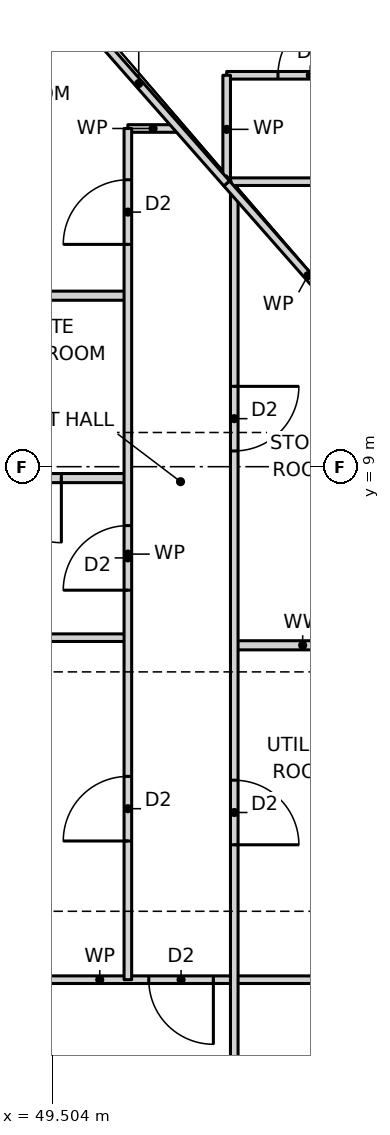
"""IFC4 building model, lengths in metres.
Left out: names, types, materials, properties, quantities, classifications, styles, units other than length and angle.
Written with IfcOpenShell. Run it as: python <this file> out.ifc"""

import sys

from ifc_helpers import new_model, si_unit, direction, frame, frame_2d, origin, place, context, subcontext, project, spatial, rectangle, extrude, element, fill, save


model = new_model("IFC4")
c1 = context("Model", 3, precision=1e-05, world=origin(), true_north=direction((0.0, 1.0)))
c2 = subcontext(c1, "Body", "Model", "MODEL_VIEW")
j1 = project(units=[si_unit("LENGTHUNIT", "METRE"), si_unit("PLANEANGLEUNIT", "RADIAN")], contexts=[c1])
p1 = place(None, origin())
s1 = spatial("IfcSite", under=j1, at=p1, CompositionType="ELEMENT")
p2 = place(p1, origin())
s2 = spatial("IfcBuilding", under=s1, at=p2, CompositionType="ELEMENT")
p3 = place(p2, frame((0.0, 0.0, 22.0)))
s3 = spatial("IfcBuildingStorey", under=s2, at=p3, CompositionType="ELEMENT", Elevation=22.0)
p4 = place(p3, frame((46.56, 2.25, 0.0), z_axis=(0.0, 0.0, 1.0), x_axis=(1.0, 0.0, 0.0)))
e1 = element("IfcWall", 1, at=p4, inside=s3, PredefinedType="PARTITIONING", context=c2, shape_type="SweptSolid", body=[
    extrude(rectangle(XDim=7.14, YDim=0.1, at=frame_2d((3.57, 0.0))), origin(), (0.0, 0.0, 1.0), 3.27),
])
p5 = place(p4, frame((4.215, 0.0, 0.0)))
e2 = element("IfcOpeningElement", 2, at=p5, cuts=e1, PredefinedType="OPENING", context=c2, shape_type="SweptSolid", body=[
    extrude(rectangle(XDim=0.85, YDim=2.1, at=frame_2d((0.425, 1.05))), frame((0.0, 0.06, 0.0), z_axis=(0.0, -1.0, 0.0), x_axis=(1.0, 0.0, 0.0)), (0.0, 0.0, 1.0), 0.12),
])
p6 = place(p3, frame((51.9, 6.65, 0.0), z_axis=(0.0, 0.0, 1.0), x_axis=(1.0, 0.0, 0.0)))
e3 = element("IfcWall", 3, at=p6, inside=s3, PredefinedType="PARTITIONING", context=c2, shape_type="SweptSolid", body=[
    extrude(rectangle(XDim=1.8, YDim=0.12, at=frame_2d((0.9, 0.0))), origin(), (0.0, 0.0, 1.0), 3.27),
])
p7 = place(p3, frame((46.56, 6.75, 0.0), z_axis=(0.0, 0.0, 1.0), x_axis=(1.0, 0.0, 0.0)))
e4 = element("IfcWall", 4, at=p7, inside=s3, PredefinedType="PARTITIONING", context=c2, shape_type="SweptSolid", body=[
    extrude(rectangle(XDim=3.94, YDim=0.1, at=frame_2d((1.97, 0.0))), origin(), (0.0, 0.0, 1.0), 3.27),
])
p8 = place(p3, frame((47.9, 8.85, 0.0), z_axis=(0.0, 0.0, 1.0), x_axis=(1.0, 0.0, 0.0)))
e5 = element("IfcWall", 5, at=p8, inside=s3, PredefinedType="PARTITIONING", context=c2, shape_type="SweptSolid", body=[
    extrude(rectangle(XDim=2.6, YDim=0.12, at=frame_2d((1.3, 0.0))), origin(), (0.0, 0.0, 1.0), 3.27),
])
p9 = place(p8, frame((0.875, 0.0, 0.0)))
e6 = element("IfcOpeningElement", 6, at=p9, cuts=e5, PredefinedType="OPENING", context=c2, shape_type="SweptSolid", body=[
    extrude(rectangle(XDim=0.85, YDim=2.1, at=frame_2d((0.425, 1.05))), frame((0.0, 0.07, 0.0), z_axis=(0.0, -1.0, 0.0), x_axis=(1.0, 0.0, 0.0)), (0.0, 0.0, 1.0), 0.14),
])
p10 = place(p3, frame((46.56, 11.25, 0.0), z_axis=(0.0, 0.0, 1.0), x_axis=(1.0, 0.0, 0.0)))
e7 = element("IfcWall", 7, at=p10, inside=s3, PredefinedType="PARTITIONING", context=c2, shape_type="SweptSolid", body=[
    extrude(rectangle(XDim=3.94, YDim=0.12, at=frame_2d((1.97, 0.0))), origin(), (0.0, 0.0, 1.0), 3.27),
])
p11 = place(p3, frame((51.8, 12.75, 0.0), z_axis=(0.0, 0.0, 1.0), x_axis=(1.0, 0.0, 0.0)))
e8 = element("IfcWall", 8, at=p11, inside=s3, PredefinedType="PARTITIONING", context=c2, shape_type="SweptSolid", body=[
    extrude(rectangle(XDim=22.4, YDim=0.1, at=frame_2d((11.2, 0.0))), origin(), (0.0, 0.0, 1.0), 3.27),
])
p12 = place(p11, frame((13.475, 0.0, 0.0)))
e9 = element("IfcOpeningElement", 9, at=p12, cuts=e8, PredefinedType="OPENING", context=c2, shape_type="SweptSolid", body=[
    extrude(rectangle(XDim=0.85, YDim=2.1, at=frame_2d((0.425, 1.05))), frame((0.0, 0.06, 0.0), z_axis=(0.0, -1.0, 0.0), x_axis=(1.0, 0.0, 0.0)), (0.0, 0.0, 1.0), 0.12),
])
p13 = place(p11, frame((10.275, 0.0, 0.0)))
e10 = element("IfcOpeningElement", 10, at=p13, cuts=e8, PredefinedType="OPENING", context=c2, shape_type="SweptSolid", body=[
    extrude(rectangle(XDim=0.85, YDim=2.1, at=frame_2d((0.425, 1.05))), frame((0.0, 0.06, 0.0), z_axis=(0.0, -1.0, 0.0), x_axis=(1.0, 0.0, 0.0)), (0.0, 0.0, 1.0), 0.12),
])
p14 = place(p11, frame((16.925, 0.0, 0.0)))
e11 = element("IfcOpeningElement", 11, at=p14, cuts=e8, PredefinedType="OPENING", context=c2, shape_type="SweptSolid", body=[
    extrude(rectangle(XDim=0.85, YDim=2.1, at=frame_2d((0.425, 1.05))), frame((0.0, 0.06, 0.0), z_axis=(0.0, -1.0, 0.0), x_axis=(1.0, 0.0, 0.0)), (0.0, 0.0, 1.0), 0.12),
])
p15 = place(p11, frame((20.275, 0.0, 0.0)))
e12 = element("IfcOpeningElement", 12, at=p15, cuts=e8, PredefinedType="OPENING", context=c2, shape_type="SweptSolid", body=[
    extrude(rectangle(XDim=0.85, YDim=2.1, at=frame_2d((0.425, 1.05))), frame((0.0, 0.06, 0.0), z_axis=(0.0, -1.0, 0.0), x_axis=(1.0, 0.0, 0.0)), (0.0, 0.0, 1.0), 0.12),
])
p16 = place(p11, frame((4.625, 0.0, 0.0)))
e13 = element("IfcOpeningElement", 13, at=p16, cuts=e8, PredefinedType="OPENING", context=c2, shape_type="SweptSolid", body=[
    extrude(rectangle(XDim=0.85, YDim=2.1, at=frame_2d((0.425, 1.05))), frame((0.0, 0.06, 0.0), z_axis=(0.0, -1.0, 0.0), x_axis=(1.0, 0.0, 0.0)), (0.0, 0.0, 1.0), 0.12),
])
p17 = place(p11, frame((1.275, 0.0, 0.0)))
e14 = element("IfcOpeningElement", 14, at=p17, cuts=e8, PredefinedType="OPENING", context=c2, shape_type="SweptSolid", body=[
    extrude(rectangle(XDim=0.85, YDim=2.1, at=frame_2d((0.425, 1.05))), frame((0.0, 0.06, 0.0), z_axis=(0.0, -1.0, 0.0), x_axis=(1.0, 0.0, 0.0)), (0.0, 0.0, 1.0), 0.12),
])
p18 = place(p3, frame((50.5, 13.45, 0.0), z_axis=(0.0, 0.0, 1.0), x_axis=(1.0, 0.0, 0.0)))
e15 = element("IfcWall", 15, at=p18, inside=s3, PredefinedType="PARTITIONING", context=c2, shape_type="SweptSolid", body=[
    extrude(rectangle(XDim=0.664, YDim=0.1, at=frame_2d((0.332, 0.0))), origin(), (0.0, 0.0, 1.0), 3.27),
])
p19 = place(p3, frame((51.8, 14.15, 0.0), z_axis=(0.0, 0.0, 1.0), x_axis=(1.0, 0.0, 0.0)))
e16 = element("IfcWall", 16, at=p19, inside=s3, PredefinedType="PARTITIONING", context=c2, shape_type="SweptSolid", body=[
    extrude(rectangle(XDim=6.7, YDim=0.1, at=frame_2d((3.35, 0.0))), origin(), (0.0, 0.0, 1.0), 3.27),
])
p20 = place(p19, frame((4.025, 0.0, 0.0)))
e17 = element("IfcOpeningElement", 17, at=p20, cuts=e16, PredefinedType="OPENING", context=c2, shape_type="SweptSolid", body=[
    extrude(rectangle(XDim=0.85, YDim=2.1, at=frame_2d((0.425, 1.05))), frame((0.0, 0.06, 0.0), z_axis=(0.0, -1.0, 0.0), x_axis=(1.0, 0.0, 0.0)), (0.0, 0.0, 1.0), 0.12),
])
p21 = place(p19, frame((0.675, 0.0, 0.0)))
e18 = element("IfcOpeningElement", 18, at=p21, cuts=e16, PredefinedType="OPENING", context=c2, shape_type="SweptSolid", body=[
    extrude(rectangle(XDim=0.85, YDim=2.1, at=frame_2d((0.425, 1.05))), frame((0.0, 0.06, 0.0), z_axis=(0.0, -1.0, 0.0), x_axis=(1.0, 0.0, 0.0)), (0.0, 0.0, 1.0), 0.12),
])
p22 = place(p3, frame((51.9, -12.614, 0.0), z_axis=(0.0, 0.0, 1.0), x_axis=(0.0, 1.0, 0.0)))
e19 = element("IfcWall", 19, at=p22, inside=s3, PredefinedType="PARTITIONING", context=c2, shape_type="SweptSolid", body=[
    extrude(rectangle(XDim=25.228, YDim=0.1, at=frame_2d((12.614, 0.0))), origin(), (0.0, 0.0, 1.0), 3.27),
])
p23 = place(p22, frame((12.639, 0.0, 0.0)))
e20 = element("IfcOpeningElement", 20, at=p23, cuts=e19, PredefinedType="OPENING", context=c2, shape_type="SweptSolid", body=[
    extrude(rectangle(XDim=0.85, YDim=2.1, at=frame_2d((0.425, 1.05))), frame((0.0, 0.06, 0.0), z_axis=(0.0, -1.0, 0.0), x_axis=(1.0, 0.0, 0.0)), (0.0, 0.0, 1.0), 0.12),
])
p24 = place(p22, frame((9.439, 0.0, 0.0)))
e21 = element("IfcOpeningElement", 21, at=p24, cuts=e19, PredefinedType="OPENING", context=c2, shape_type="SweptSolid", body=[
    extrude(rectangle(XDim=0.85, YDim=2.1, at=frame_2d((0.425, 1.05))), frame((0.0, 0.06, 0.0), z_axis=(0.0, -1.0, 0.0), x_axis=(1.0, 0.0, 0.0)), (0.0, 0.0, 1.0), 0.12),
])
p25 = place(p22, frame((16.639, 0.0, 0.0)))
e22 = element("IfcOpeningElement", 22, at=p25, cuts=e19, PredefinedType="OPENING", context=c2, shape_type="SweptSolid", body=[
    extrude(rectangle(XDim=0.85, YDim=2.1, at=frame_2d((0.425, 1.05))), frame((0.0, 0.06, 0.0), z_axis=(0.0, -1.0, 0.0), x_axis=(1.0, 0.0, 0.0)), (0.0, 0.0, 1.0), 0.12),
])
p26 = place(p22, frame((21.821, 0.0, 0.0)))
e23 = element("IfcOpeningElement", 23, at=p26, cuts=e19, PredefinedType="OPENING", context=c2, shape_type="SweptSolid", body=[
    extrude(rectangle(XDim=0.85, YDim=2.1, at=frame_2d((0.425, 1.05))), frame((0.0, 0.06, 0.0), z_axis=(0.0, -1.0, 0.0), x_axis=(1.0, 0.0, 0.0)), (0.0, 0.0, 1.0), 0.12),
])
p27 = place(p22, frame((2.507, 0.0, 0.0)))
e24 = element("IfcOpeningElement", 24, at=p27, cuts=e19, PredefinedType="OPENING", context=c2, shape_type="SweptSolid", body=[
    extrude(rectangle(XDim=0.85, YDim=2.1, at=frame_2d((0.425, 1.05))), frame((0.0, 0.06, 0.0), z_axis=(0.0, -1.0, 0.0), x_axis=(1.0, 0.0, 0.0)), (0.0, 0.0, 1.0), 0.12),
])
p28 = place(p3, frame((51.8, 12.727, 0.0), z_axis=(0.0, 0.0, 1.0), x_axis=(0.0, 1.0, 0.0)))
e25 = element("IfcWall", 25, at=p28, inside=s3, PredefinedType="PARTITIONING", context=c2, shape_type="SweptSolid", body=[
    extrude(rectangle(XDim=1.423, YDim=0.1, at=frame_2d((0.711, 0.0))), origin(), (0.0, 0.0, 1.0), 3.27),
])
p29 = place(p3, frame((50.5, 2.25, 0.0), z_axis=(0.0, 0.0, 1.0), x_axis=(0.0, 1.0, 0.0)))
e26 = element("IfcWall", 26, at=p29, inside=s3, PredefinedType="PARTITIONING", context=c2, shape_type="SweptSolid", body=[
    extrude(rectangle(XDim=11.2, YDim=0.1, at=frame_2d((5.6, 0.0))), origin(), (0.0, 0.0, 1.0), 3.27),
])
p30 = place(p29, frame((1.825, 0.0, 0.0)))
e27 = element("IfcOpeningElement", 27, at=p30, cuts=e26, PredefinedType="OPENING", context=c2, shape_type="SweptSolid", body=[
    extrude(rectangle(XDim=0.85, YDim=2.1, at=frame_2d((0.425, 1.05))), frame((0.0, 0.06, 0.0), z_axis=(0.0, -1.0, 0.0), x_axis=(1.0, 0.0, 0.0)), (0.0, 0.0, 1.0), 0.12),
])
p31 = place(p29, frame((5.125, 0.0, 0.0)))
e28 = element("IfcOpeningElement", 28, at=p31, cuts=e26, PredefinedType="OPENING", context=c2, shape_type="SweptSolid", body=[
    extrude(rectangle(XDim=0.85, YDim=2.1, at=frame_2d((0.425, 1.05))), frame((0.0, 0.06, 0.0), z_axis=(0.0, -1.0, 0.0), x_axis=(1.0, 0.0, 0.0)), (0.0, 0.0, 1.0), 0.12),
])
p32 = place(p29, frame((9.675, 0.0, 0.0)))
e29 = element("IfcOpeningElement", 29, at=p32, cuts=e26, PredefinedType="OPENING", context=c2, shape_type="SweptSolid", body=[
    extrude(rectangle(XDim=0.85, YDim=2.1, at=frame_2d((0.425, 1.05))), frame((0.0, 0.06, 0.0), z_axis=(0.0, -1.0, 0.0), x_axis=(1.0, 0.0, 0.0)), (0.0, 0.0, 1.0), 0.12),
])
p33 = place(p3, frame((53.936, 10.3, 0.0), z_axis=(0.0, 0.0, 1.0), x_axis=(-0.660667046586, 0.75067906162, 0.0)))
e30 = element("IfcWall", 30, at=p33, inside=s3, PredefinedType="PARTITIONING", context=c2, shape_type="SweptSolid", body=[
    extrude(rectangle(XDim=3.233, YDim=0.1, at=frame_2d((1.617, 0.0))), origin(), (0.0, 0.0, 1.0), 2.429),
])
p34 = place(p3, frame((51.8, 12.727, 0.0), z_axis=(0.0, 0.0, 1.0), x_axis=(-0.660690123093, 0.750658751529, 0.0)))
e31 = element("IfcWall", 31, at=p34, inside=s3, PredefinedType="PARTITIONING", context=c2, shape_type="SweptSolid", body=[
    extrude(rectangle(XDim=5.837, YDim=0.1, at=frame_2d((2.918, 0.0))), origin(), (0.0, 0.0, 1.0), 2.429),
])
p35 = place(p21, origin())
e32 = element("IfcDoor", 32, at=p35, inside=s3, OperationType="SINGLE_SWING_RIGHT", PredefinedType="DOOR", context=c2, shape_type="SweptSolid", body=[
    extrude(rectangle(XDim=0.85, YDim=2.1, at=frame_2d((0.425, 1.05))), frame((0.0, 0.025, 0.0), z_axis=(0.0, -1.0, 0.0), x_axis=(1.0, 0.0, 0.0)), (0.0, 0.0, 1.0), 0.05),
])
fill(e18, e32)
p36 = place(p5, frame((0.85, 0.0, 0.0), z_axis=(0.0, 0.0, 1.0), x_axis=(-1.0, 0.0, 0.0)))
e33 = element("IfcDoor", 33, at=p36, inside=s3, OperationType="SINGLE_SWING_LEFT", PredefinedType="DOOR", context=c2, shape_type="SweptSolid", body=[
    extrude(rectangle(XDim=0.85, YDim=2.1, at=frame_2d((0.425, 1.05))), frame((0.0, 0.025, 0.0), z_axis=(0.0, -1.0, 0.0), x_axis=(1.0, 0.0, 0.0)), (0.0, 0.0, 1.0), 0.05),
])
fill(e2, e33)
p37 = place(p30, origin())
e34 = element("IfcDoor", 34, at=p37, inside=s3, OperationType="SINGLE_SWING_LEFT", PredefinedType="DOOR", context=c2, shape_type="SweptSolid", body=[
    extrude(rectangle(XDim=0.85, YDim=2.1, at=frame_2d((0.425, 1.05))), frame((0.0, 0.025, 0.0), z_axis=(0.0, -1.0, 0.0), x_axis=(1.0, 0.0, 0.0)), (0.0, 0.0, 1.0), 0.05),
])
fill(e27, e34)
p38 = place(p9, frame((0.85, 0.0, 0.0), z_axis=(0.0, 0.0, 1.0), x_axis=(-1.0, 0.0, 0.0)))
e35 = element("IfcDoor", 35, at=p38, inside=s3, OperationType="SINGLE_SWING_LEFT", PredefinedType="DOOR", context=c2, shape_type="SweptSolid", body=[
    extrude(rectangle(XDim=0.85, YDim=2.1, at=frame_2d((0.425, 1.05))), frame((0.0, 0.025, 0.0), z_axis=(0.0, -1.0, 0.0), x_axis=(1.0, 0.0, 0.0)), (0.0, 0.0, 1.0), 0.05),
])
fill(e6, e35)
p39 = place(p31, origin())
e36 = element("IfcDoor", 36, at=p39, inside=s3, OperationType="SINGLE_SWING_LEFT", PredefinedType="DOOR", context=c2, shape_type="SweptSolid", body=[
    extrude(rectangle(XDim=0.85, YDim=2.1, at=frame_2d((0.425, 1.05))), frame((0.0, 0.025, 0.0), z_axis=(0.0, -1.0, 0.0), x_axis=(1.0, 0.0, 0.0)), (0.0, 0.0, 1.0), 0.05),
])
fill(e28, e36)
p40 = place(p32, origin())
e37 = element("IfcDoor", 37, at=p40, inside=s3, OperationType="SINGLE_SWING_LEFT", PredefinedType="DOOR", context=c2, shape_type="SweptSolid", body=[
    extrude(rectangle(XDim=0.85, YDim=2.1, at=frame_2d((0.425, 1.05))), frame((0.0, 0.025, 0.0), z_axis=(0.0, -1.0, 0.0), x_axis=(1.0, 0.0, 0.0)), (0.0, 0.0, 1.0), 0.05),
])
fill(e29, e37)
p41 = place(p25, frame((0.85, 0.0, 0.0), z_axis=(0.0, 0.0, 1.0), x_axis=(-1.0, 0.0, 0.0)))
e38 = element("IfcDoor", 38, at=p41, inside=s3, OperationType="SINGLE_SWING_RIGHT", PredefinedType="DOOR", context=c2, shape_type="SweptSolid", body=[
    extrude(rectangle(XDim=0.85, YDim=2.1, at=frame_2d((0.425, 1.05))), frame((0.0, 0.025, 0.0), z_axis=(0.0, -1.0, 0.0), x_axis=(1.0, 0.0, 0.0)), (0.0, 0.0, 1.0), 0.05),
])
fill(e22, e38)
p42 = place(p26, frame((0.85, 0.0, 0.0), z_axis=(0.0, 0.0, 1.0), x_axis=(-1.0, 0.0, 0.0)))
e39 = element("IfcDoor", 39, at=p42, inside=s3, OperationType="SINGLE_SWING_LEFT", PredefinedType="DOOR", context=c2, shape_type="SweptSolid", body=[
    extrude(rectangle(XDim=0.85, YDim=2.1, at=frame_2d((0.425, 1.05))), frame((0.0, 0.025, 0.0), z_axis=(0.0, -1.0, 0.0), x_axis=(1.0, 0.0, 0.0)), (0.0, 0.0, 1.0), 0.05),
])
fill(e23, e39)
save(model, sys.argv[1])
